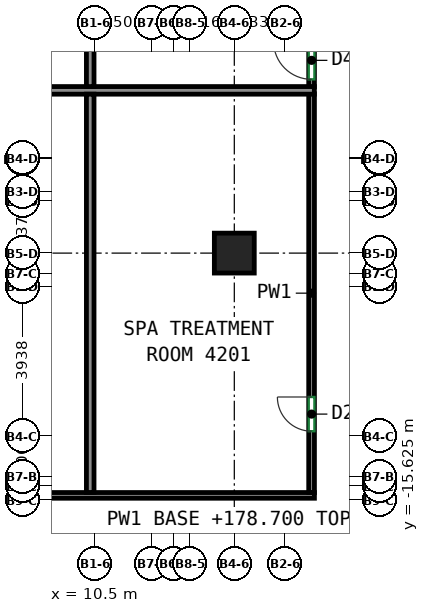
"""IFC4 building model, lengths in metres.
Left out: names, types, materials, properties, quantities, classifications, styles, units other than length and angle.
Written with IfcOpenShell. Run it as: python <this file> out.ifc"""

import sys

from ifc_helpers import new_model, si_unit, direction, frame, frame_2d, origin, origin_2d, place, context, subcontext, project, spatial, rectangle, extrude, source, transform, mapped, element, fill, save


model = new_model("IFC4")
c1 = context("Model", 3, precision=1e-05, world=origin(), true_north=direction((0.0, 1.0)))
c2 = subcontext(c1, "Body", "Model", "MODEL_VIEW")
j1 = project(units=[si_unit("LENGTHUNIT", "METRE"), si_unit("PLANEANGLEUNIT", "RADIAN")], contexts=[c1])
p1 = place(None, origin())
s1 = spatial("IfcSite", under=j1, at=p1, CompositionType="ELEMENT")
p2 = place(p1, origin())
s2 = spatial("IfcBuilding", under=s1, at=p2, CompositionType="ELEMENT")
p3 = place(p2, frame((0.0, 0.0, 178.7)))
s3 = spatial("IfcBuildingStorey", under=s2, at=p3, CompositionType="ELEMENT", Elevation=178.7)
m1 = source(origin(), c2, "Body", "SweptSolid", [
    extrude(rectangle(XDim=1.05, YDim=1.05, at=origin_2d()), origin(), (0.0, 0.0, 1.0), 3.12),
])
p4 = place(p3, frame((14.167, -9.125, 0.0), z_axis=(0.0, 0.0, 1.0), x_axis=(1.0, 0.0, 0.0)))
e1 = element("IfcColumn", 1, at=p4, inside=s3, PredefinedType="COLUMN", context=c2, shape_type="MappedRepresentation", body=[
    mapped(m1, transform((0.0, 0.0, 0.0))),
])
p5 = place(p3, frame((16.2, -4.753, 0.0), z_axis=(0.0, 0.0, 1.0), x_axis=(0.0, 1.0, 0.0)))
e2 = element("IfcWall", 2, at=p5, inside=s3, PredefinedType="PARTITIONING", context=c2, shape_type="SweptSolid", body=[
    extrude(rectangle(XDim=8.378, YDim=0.15, at=frame_2d((4.189, 0.0))), origin(), (0.0, 0.0, 1.0), 3.12),
])
p6 = place(p5, frame((0.2, 0.0, 0.0)))
e3 = element("IfcOpeningElement", 3, at=p6, cuts=e2, PredefinedType="OPENING", context=c2, shape_type="SweptSolid", body=[
    extrude(rectangle(XDim=1.0, YDim=2.1, at=frame_2d((0.5, 1.05))), frame((0.0, 0.085, 0.0), z_axis=(0.0, -1.0, 0.0), x_axis=(1.0, 0.0, 0.0)), (0.0, 0.0, 1.0), 0.17),
])
p7 = place(p3, frame((-4.802, -15.5, 0.0), z_axis=(0.0, 0.0, 1.0), x_axis=(1.0, 0.0, 0.0)))
e4 = element("IfcWall", 4, at=p7, inside=s3, PredefinedType="PARTITIONING", context=c2, shape_type="SweptSolid", body=[
    extrude(rectangle(XDim=21.077, YDim=0.15, at=frame_2d((10.539, 0.0))), origin(), (0.0, 0.0, 1.0), 3.12),
])
p8 = place(p7, frame((6.372, 0.0, 0.0)))
e5 = element("IfcOpeningElement", 5, at=p8, cuts=e4, PredefinedType="OPENING", context=c2, shape_type="SweptSolid", body=[
    extrude(rectangle(XDim=0.9, YDim=2.1, at=frame_2d((0.45, 1.05))), frame((0.0, 0.085, 0.0), z_axis=(0.0, -1.0, 0.0), x_axis=(1.0, 0.0, 0.0)), (0.0, 0.0, 1.0), 0.17),
])
p9 = place(p7, frame((7.815, 0.0, 0.0)))
e6 = element("IfcOpeningElement", 6, at=p9, cuts=e4, PredefinedType="OPENING", context=c2, shape_type="SweptSolid", body=[
    extrude(rectangle(XDim=0.9, YDim=2.1, at=frame_2d((0.45, 1.05))), frame((0.0, 0.085, 0.0), z_axis=(0.0, -1.0, 0.0), x_axis=(1.0, 0.0, 0.0)), (0.0, 0.0, 1.0), 0.17),
])
p10 = place(p3, frame((16.2, -15.425, 0.0), z_axis=(0.0, 0.0, 1.0), x_axis=(0.0, 1.0, 0.0)))
e7 = element("IfcWall", 7, at=p10, inside=s3, PredefinedType="PARTITIONING", context=c2, shape_type="SweptSolid", body=[
    extrude(rectangle(XDim=10.492, YDim=0.15, at=frame_2d((5.246, 0.0))), origin(), (0.0, 0.0, 1.0), 3.12),
])
p11 = place(p10, frame((1.614, 0.0, 0.0)))
e8 = element("IfcOpeningElement", 8, at=p11, cuts=e7, PredefinedType="OPENING", context=c2, shape_type="SweptSolid", body=[
    extrude(rectangle(XDim=0.9, YDim=2.1, at=frame_2d((0.45, 1.05))), frame((0.0, 0.085, 0.0), z_axis=(0.0, -1.0, 0.0), x_axis=(1.0, 0.0, 0.0)), (0.0, 0.0, 1.0), 0.17),
])
p12 = place(p3, frame((-13.873, -4.843, 0.0), z_axis=(0.0, 0.0, 1.0), x_axis=(1.0, 0.0, 0.0)))
e9 = element("IfcWall", 9, at=p12, inside=s3, PredefinedType="PARTITIONING", context=c2, shape_type="SweptSolid", body=[
    extrude(rectangle(XDim=30.146, YDim=0.2, at=frame_2d((15.073, 0.0))), origin(), (0.0, 0.0, 1.0), 3.12),
])
p13 = place(p3, frame((10.375, -4.743, 0.0), z_axis=(0.0, 0.0, 1.0), x_axis=(0.0, 1.0, 0.0)))
e10 = element("IfcWall", 10, at=p13, inside=s3, PredefinedType="PARTITIONING", context=c2, shape_type="SweptSolid", body=[
    extrude(rectangle(XDim=8.366, YDim=0.2, at=frame_2d((4.183, 0.0))), origin(), (0.0, 0.0, 1.0), 3.12),
])
p14 = place(p3, frame((10.375, -15.423, 0.0), z_axis=(0.0, 0.0, 1.0), x_axis=(0.0, 1.0, 0.0)))
e11 = element("IfcWall", 11, at=p14, inside=s3, PredefinedType="PARTITIONING", context=c2, shape_type="SweptSolid", body=[
    extrude(rectangle(XDim=10.48, YDim=0.2, at=frame_2d((5.24, 0.0))), origin(), (0.0, 0.0, 1.0), 3.12),
])
p15 = place(p11, origin())
e12 = element("IfcDoor", 12, at=p15, inside=s3, OperationType="SINGLE_SWING_RIGHT", PredefinedType="DOOR", context=c2, shape_type="SweptSolid", body=[
    extrude(rectangle(XDim=0.9, YDim=2.1, at=frame_2d((0.45, 1.05))), frame((0.0, 0.025, 0.0), z_axis=(0.0, -1.0, 0.0), x_axis=(1.0, 0.0, 0.0)), (0.0, 0.0, 1.0), 0.05),
])
fill(e8, e12)
p16 = place(p6, origin())
e13 = element("IfcDoor", 13, at=p16, inside=s3, OperationType="SINGLE_SWING_RIGHT", PredefinedType="DOOR", context=c2, shape_type="SweptSolid", body=[
    extrude(rectangle(XDim=1.0, YDim=2.1, at=frame_2d((0.5, 1.05))), frame((0.0, 0.025, 0.0), z_axis=(0.0, -1.0, 0.0), x_axis=(1.0, 0.0, 0.0)), (0.0, 0.0, 1.0), 0.05),
])
fill(e3, e13)
save(model, sys.argv[1])
